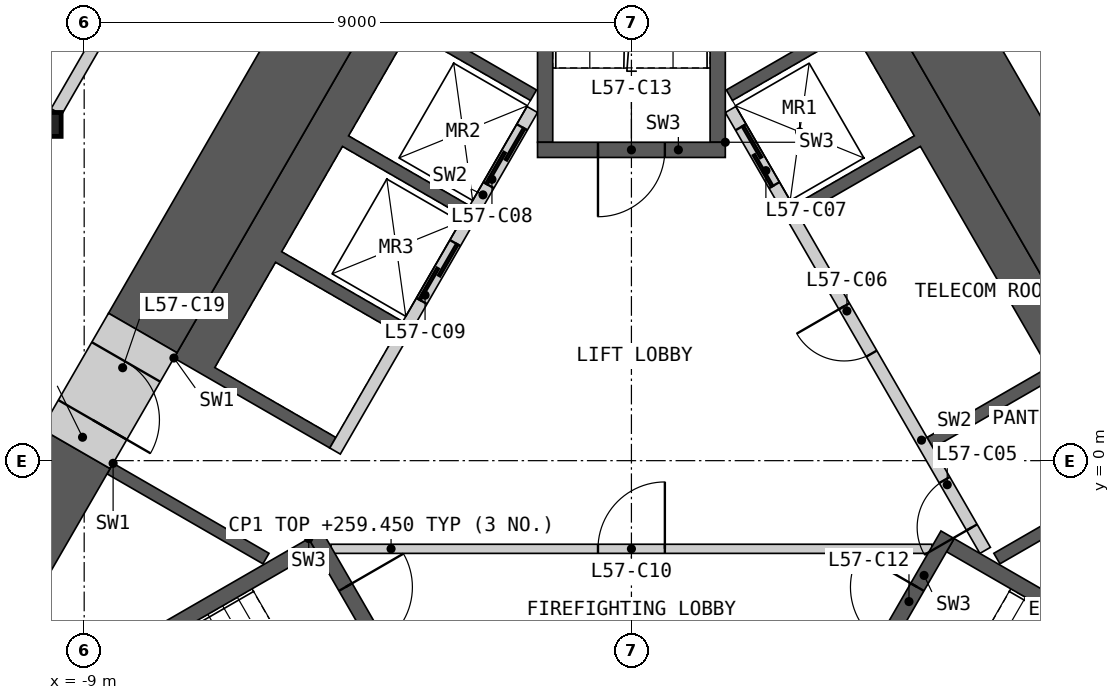
"""IFC4 building model, lengths in metres.
Left out: names, types, materials, properties, quantities, classifications, styles, units other than length and angle.
Written with IfcOpenShell. Run it as: python <this file> out.ifc"""

import sys

from ifc_helpers import new_model, si_unit, direction, frame, frame_2d, origin, origin_2d, place, context, subcontext, project, spatial, polyline, rectangle, i_section, outline, extrude, element, fill, save


model = new_model("IFC4")
c1 = context("Model", 3, precision=1e-05, world=origin(), true_north=direction((0.0, 1.0)))
c2 = subcontext(c1, "Body", "Model", "MODEL_VIEW")
j1 = project(units=[si_unit("LENGTHUNIT", "METRE"), si_unit("PLANEANGLEUNIT", "RADIAN")], contexts=[c1])
p1 = place(None, origin())
s1 = spatial("IfcSite", under=j1, at=p1, CompositionType="ELEMENT")
p2 = place(p1, origin())
s2 = spatial("IfcBuilding", under=s1, at=p2, CompositionType="ELEMENT")
p3 = place(p2, frame((0.0, 0.0, 256.2)))
s3 = spatial("IfcBuildingStorey", under=s2, at=p3, CompositionType="ELEMENT", Elevation=256.2)
p4 = place(p3, frame((-9.578, 5.53, 0.0), z_axis=(0.0, 0.0, 1.0), x_axis=(1.0, 0.0, 0.0)))
e1 = element("IfcColumn", 1, at=p4, inside=s3, PredefinedType="COLUMN", context=c2, shape_type="SweptSolid", body=[
    extrude(i_section(OverallWidth=0.399, OverallDepth=0.393, WebThickness=0.023, FlangeThickness=0.037, at=origin_2d()), origin(), (0.0, 0.0, 1.0), 3.6),
])
p5 = place(p3, origin())
e2 = element("IfcWall", 2, at=p5, inside=s3, PredefinedType="SHEAR", context=c2, shape_type="SweptSolid", body=[
    extrude(outline(polyline([(8.524, -0.044), (8.624, -0.217), (8.231, -0.444), (6.061, -1.697), (5.96, -1.524), (8.131, -0.271), (8.524, -0.044)])), origin(), (0.0, 0.0, 1.0), 3.25),
])
p6 = place(p3, origin())
e3 = element("IfcWall", 3, at=p6, inside=s3, PredefinedType="SHEAR", context=c2, shape_type="SweptSolid", body=[
    extrude(outline(polyline([(7.524, 1.688), (7.131, 1.461), (4.96, 0.208), (4.861, 0.381), (6.852, 1.531), (4.752, 5.169), (2.76, 4.019), (2.66, 4.192), (4.652, 5.342), (3.652, 7.074), (1.66, 5.924), (1.561, 6.097), (3.731, 7.35), (4.124, 7.577), (7.524, 1.688)])), origin(), (0.0, 0.0, 1.0), 3.25),
])
p7 = place(p3, frame((5.817, -1.476, 0.0), z_axis=(0.0, 0.0, 1.0), x_axis=(-0.500002616675, 0.866023893041, 0.0)))
e4 = element("IfcWall", 4, at=p7, inside=s3, PredefinedType="SOLIDWALL", context=c2, shape_type="SweptSolid", body=[
    extrude(rectangle(XDim=8.373, YDim=0.2, at=frame_2d((4.187, 0.0))), origin(), (0.0, 0.0, 1.0), 3.25),
])
p8 = place(p7, frame((0.437, 0.0, 0.0)))
e5 = element("IfcOpeningElement", 5, at=p8, cuts=e4, PredefinedType="OPENING", context=c2, shape_type="SweptSolid", body=[
    extrude(rectangle(XDim=0.9, YDim=2.1, at=frame_2d((0.45, 1.05))), frame((0.0, 0.11, 0.0), z_axis=(0.0, -1.0, 0.0), x_axis=(1.0, 0.0, 0.0)), (0.0, 0.0, 1.0), 0.22),
])
p9 = place(p7, frame((3.737, 0.0, 0.0)))
e6 = element("IfcOpeningElement", 6, at=p9, cuts=e4, PredefinedType="OPENING", context=c2, shape_type="SweptSolid", body=[
    extrude(rectangle(XDim=0.9, YDim=2.1, at=frame_2d((0.45, 1.05))), frame((0.0, 0.11, 0.0), z_axis=(0.0, -1.0, 0.0), x_axis=(1.0, 0.0, 0.0)), (0.0, 0.0, 1.0), 0.22),
])
p10 = place(p7, frame((6.937, 0.0, 0.0)))
e7 = element("IfcOpeningElement", 7, at=p10, cuts=e4, PredefinedType="OPENING", context=c2, shape_type="SweptSolid", body=[
    extrude(rectangle(XDim=1.1, YDim=2.1, at=frame_2d((0.55, 1.05))), frame((0.0, 0.11, 0.0), z_axis=(0.0, -1.0, 0.0), x_axis=(1.0, 0.0, 0.0)), (0.0, 0.0, 1.0), 0.22),
])
p11 = place(p3, origin())
e8 = element("IfcWall", 8, at=p11, inside=s3, PredefinedType="SHEAR", context=c2, shape_type="SweptSolid", body=[
    extrude(outline(polyline([(-7.524, 1.688), (-4.124, 7.577), (-3.731, 7.35), (-1.561, 6.097), (-1.66, 5.924), (-3.652, 7.074), (-4.652, 5.342), (-2.66, 4.192), (-2.76, 4.019), (-4.752, 5.169), (-5.752, 3.437), (-3.76, 2.287), (-3.861, 2.113), (-5.852, 3.263), (-6.852, 1.531), (-4.861, 0.381), (-4.96, 0.208), (-7.131, 1.461), (-7.524, 1.688)])), origin(), (0.0, 0.0, 1.0), 3.25),
])
p12 = place(p3, origin())
e9 = element("IfcWall", 9, at=p12, inside=s3, PredefinedType="SHEAR", context=c2, shape_type="SweptSolid", body=[
    extrude(outline(polyline([(-8.524, -0.044), (-8.131, -0.271), (-5.96, -1.524), (-6.061, -1.697), (-8.231, -0.444), (-8.624, -0.217), (-8.524, -0.044)])), origin(), (0.0, 0.0, 1.0), 3.25),
])
p13 = place(p3, frame((-1.631, 5.776, 0.0), z_axis=(0.0, 0.0, 1.0), x_axis=(-0.499992876559, -0.866029516466, 0.0)))
e10 = element("IfcWall", 10, at=p13, inside=s3, PredefinedType="SOLIDWALL", context=c2, shape_type="SweptSolid", body=[
    extrude(rectangle(XDim=6.486, YDim=0.2, at=frame_2d((3.243, 0.0))), origin(), (0.0, 0.0, 1.0), 3.25),
])
p14 = place(p13, frame((0.337, 0.0, 0.0)))
e11 = element("IfcOpeningElement", 11, at=p14, cuts=e10, PredefinedType="OPENING", context=c2, shape_type="SweptSolid", body=[
    extrude(rectangle(XDim=1.1, YDim=2.1, at=frame_2d((0.55, 1.05))), frame((0.0, 0.11, 0.0), z_axis=(0.0, -1.0, 0.0), x_axis=(1.0, 0.0, 0.0)), (0.0, 0.0, 1.0), 0.22),
])
p15 = place(p13, frame((2.537, 0.0, 0.0)))
e12 = element("IfcOpeningElement", 12, at=p15, cuts=e10, PredefinedType="OPENING", context=c2, shape_type="SweptSolid", body=[
    extrude(rectangle(XDim=1.1, YDim=2.1, at=frame_2d((0.55, 1.05))), frame((0.0, 0.11, 0.0), z_axis=(0.0, -1.0, 0.0), x_axis=(1.0, 0.0, 0.0)), (0.0, 0.0, 1.0), 0.22),
])
p16 = place(p3, frame((-4.941, -1.45, 0.0), z_axis=(0.0, 0.0, 1.0), x_axis=(1.0, 0.0, 0.0)))
e13 = element("IfcWall", 13, at=p16, inside=s3, PredefinedType="PARTITIONING", context=c2, shape_type="SweptSolid", body=[
    extrude(rectangle(XDim=9.882, YDim=0.15, at=frame_2d((4.941, 0.0))), origin(), (0.0, 0.0, 1.0), 3.25),
])
p17 = place(p16, frame((4.391, 0.0, 0.0)))
e14 = element("IfcOpeningElement", 14, at=p17, cuts=e13, PredefinedType="OPENING", context=c2, shape_type="SweptSolid", body=[
    extrude(rectangle(XDim=1.1, YDim=2.1, at=frame_2d((0.55, 1.05))), frame((0.0, 0.085, 0.0), z_axis=(0.0, -1.0, 0.0), x_axis=(1.0, 0.0, 0.0)), (0.0, 0.0, 1.0), 0.17),
])
p18 = place(p3, origin())
e15 = element("IfcWall", 15, at=p18, inside=s3, PredefinedType="SHEAR", context=c2, shape_type="SweptSolid", body=[
    extrude(outline(polyline([(-5.307, -1.281), (-10.374, -4.206), (-10.032, -4.298), (-5.182, -1.498), (-5.307, -1.281)])), origin(), (0.0, 0.0, 1.0), 3.25),
])
p19 = place(p3, frame((-5.199, -1.219, 0.0), z_axis=(0.0, 0.0, 1.0), x_axis=(0.499982516597, -0.866035497597, 0.0)))
e16 = element("IfcWall", 16, at=p19, inside=s3, PredefinedType="SHEAR", context=c2, shape_type="SweptSolid", body=[
    extrude(rectangle(XDim=3.088, YDim=0.25, at=frame_2d((1.544, 0.0))), origin(), (0.0, 0.0, 1.0), 3.25),
])
p20 = place(p19, frame((0.994, 0.0, 0.0)))
e17 = element("IfcOpeningElement", 17, at=p20, cuts=e16, PredefinedType="OPENING", context=c2, shape_type="SweptSolid", body=[
    extrude(rectangle(XDim=1.1, YDim=2.1, at=frame_2d((0.55, 1.05))), frame((0.0, 0.135, 0.0), z_axis=(0.0, -1.0, 0.0), x_axis=(1.0, 0.0, 0.0)), (0.0, 0.0, 1.0), 0.27),
])
p21 = place(p3, origin())
e18 = element("IfcWall", 18, at=p21, inside=s3, PredefinedType="SHEAR", context=c2, shape_type="SweptSolid", body=[
    extrude(outline(polyline([(10.032, -4.298), (10.374, -4.206), (5.307, -1.281), (5.182, -1.498), (10.032, -4.298)])), origin(), (0.0, 0.0, 1.0), 3.25),
])
p22 = place(p3, frame((3.655, -3.893, 0.0), z_axis=(0.0, 0.0, 1.0), x_axis=(0.499982516597, 0.866035497597, 0.0)))
e19 = element("IfcWall", 19, at=p22, inside=s3, PredefinedType="SHEAR", context=c2, shape_type="SweptSolid", body=[
    extrude(rectangle(XDim=3.088, YDim=0.25, at=frame_2d((1.544, 0.0))), origin(), (0.0, 0.0, 1.0), 3.25),
])
p23 = place(p22, frame((0.994, 0.0, 0.0)))
e20 = element("IfcOpeningElement", 20, at=p23, cuts=e19, PredefinedType="OPENING", context=c2, shape_type="SweptSolid", body=[
    extrude(rectangle(XDim=1.1, YDim=2.1, at=frame_2d((0.55, 1.05))), frame((0.0, 0.135, 0.0), z_axis=(0.0, -1.0, 0.0), x_axis=(1.0, 0.0, 0.0)), (0.0, 0.0, 1.0), 0.27),
])
p24 = place(p3, origin())
e21 = element("IfcWall", 21, at=p24, inside=s3, PredefinedType="SHEAR", context=c2, shape_type="SweptSolid", body=[
    extrude(outline(polyline([(1.544, 5.237), (1.544, 11.087), (1.294, 10.837), (1.294, 5.237), (1.544, 5.237)])), origin(), (0.0, 0.0, 1.0), 3.25),
])
p25 = place(p3, origin())
e22 = element("IfcWall", 22, at=p25, inside=s3, PredefinedType="SHEAR", context=c2, shape_type="SweptSolid", body=[
    extrude(outline(polyline([(-1.294, 10.837), (-1.544, 11.087), (-1.544, 5.237), (-1.294, 5.237), (-1.294, 10.837)])), origin(), (0.0, 0.0, 1.0), 3.25),
])
p26 = place(p3, frame((1.544, 5.112, 0.0), z_axis=(0.0, 0.0, 1.0), x_axis=(-1.0, 0.0, 0.0)))
e23 = element("IfcWall", 23, at=p26, inside=s3, PredefinedType="SHEAR", context=c2, shape_type="SweptSolid", body=[
    extrude(rectangle(XDim=3.088, YDim=0.25, at=frame_2d((1.544, 0.0))), origin(), (0.0, 0.0, 1.0), 3.25),
])
p27 = place(p26, frame((0.994, 0.0, 0.0)))
e24 = element("IfcOpeningElement", 24, at=p27, cuts=e23, PredefinedType="OPENING", context=c2, shape_type="SweptSolid", body=[
    extrude(rectangle(XDim=1.1, YDim=2.1, at=frame_2d((0.55, 1.05))), frame((0.0, 0.135, 0.0), z_axis=(0.0, -1.0, 0.0), x_axis=(1.0, 0.0, 0.0)), (0.0, 0.0, 1.0), 0.27),
])
p28 = place(p3, frame((10.081, -1.441, 0.0), z_axis=(0.0, 0.0, 1.0), x_axis=(-0.500006109471, 0.866021876451, 0.0)))
e25 = element("IfcWall", 25, at=p28, inside=s3, PredefinedType="SHEAR", context=c2, shape_type="SweptSolid", body=[
    extrude(rectangle(XDim=11.672, YDim=1.3, at=frame_2d((5.836, 0.0))), origin(), (0.0, 0.0, 1.0), 3.25),
])
p29 = place(p3, frame((-4.245, 8.668, 0.0), z_axis=(0.0, 0.0, 1.0), x_axis=(-0.500002971097, -0.866023688414, 0.0)))
e26 = element("IfcWall", 26, at=p29, inside=s3, PredefinedType="SHEAR", context=c2, shape_type="SweptSolid", body=[
    extrude(rectangle(XDim=7.584, YDim=1.3, at=frame_2d((3.792, 0.0))), origin(), (0.0, 0.0, 1.0), 3.25),
])
p30 = place(p3, frame((-9.137, 0.195, 0.0), z_axis=(0.0, 0.0, 1.0), x_axis=(-0.499985697398, -0.866033661238, 0.0)))
e27 = element("IfcWall", 27, at=p30, inside=s3, PredefinedType="SHEAR", context=c2, shape_type="SweptSolid", body=[
    extrude(rectangle(XDim=4.362, YDim=1.3, at=frame_2d((2.181, 0.0))), origin(), (0.0, 0.0, 1.0), 3.25),
])
p31 = place(p3, frame((-8.037, 2.1, 0.0), z_axis=(0.0, 0.0, 1.0), x_axis=(-0.50002983664, -0.866008176907, 0.0)))
e28 = element("IfcWall", 28, at=p31, inside=s3, PredefinedType="SHEAR", context=c2, shape_type="SweptSolid", body=[
    extrude(rectangle(XDim=2.2, YDim=1.3, at=frame_2d((1.1, 0.0))), origin(), (0.0, 0.0, 1.0), 3.25),
])
p32 = place(p31, frame((0.55, 0.0, 0.0)))
e29 = element("IfcOpeningElement", 29, at=p32, cuts=e28, PredefinedType="OPENING", context=c2, shape_type="SweptSolid", body=[
    extrude(rectangle(XDim=1.1, YDim=2.1, at=frame_2d((0.55, 1.05))), frame((0.0, 0.66, 0.0), z_axis=(0.0, -1.0, 0.0), x_axis=(1.0, 0.0, 0.0)), (0.0, 0.0, 1.0), 1.32),
])
p33 = place(p3, frame((5.377, 18.807, 0.0), z_axis=(0.0, 0.0, 1.0), x_axis=(0.499999852422, -0.866025488988, 0.0)))
e30 = element("IfcWall", 30, at=p33, inside=s3, PredefinedType="PARTITIONING", context=c2, shape_type="SweptSolid", body=[
    extrude(rectangle(XDim=27.198, YDim=0.2, at=frame_2d((13.599, 0.0))), origin(), (0.0, 0.0, 1.0), 3.25),
])
p34 = place(p33, frame((25.096, 0.0, 0.0)))
e31 = element("IfcOpeningElement", 31, at=p34, cuts=e30, PredefinedType="OPENING", context=c2, shape_type="SweptSolid", body=[
    extrude(rectangle(XDim=0.95, YDim=2.1, at=frame_2d((0.475, 1.05))), frame((0.0, 0.11, 0.0), z_axis=(0.0, -1.0, 0.0), x_axis=(1.0, 0.0, 0.0)), (0.0, 0.0, 1.0), 0.22),
])
p35 = place(p33, frame((19.122, 0.0, 0.0)))
e32 = element("IfcOpeningElement", 32, at=p35, cuts=e30, PredefinedType="OPENING", context=c2, shape_type="SweptSolid", body=[
    extrude(rectangle(XDim=1.0, YDim=2.1, at=frame_2d((0.5, 1.05))), frame((0.0, 0.11, 0.0), z_axis=(0.0, -1.0, 0.0), x_axis=(1.0, 0.0, 0.0)), (0.0, 0.0, 1.0), 0.22),
])
p36 = place(p33, frame((17.115, 0.0, 0.0)))
e33 = element("IfcOpeningElement", 33, at=p36, cuts=e30, PredefinedType="OPENING", context=c2, shape_type="SweptSolid", body=[
    extrude(rectangle(XDim=1.1, YDim=2.1, at=frame_2d((0.55, 1.05))), frame((0.0, 0.11, 0.0), z_axis=(0.0, -1.0, 0.0), x_axis=(1.0, 0.0, 0.0)), (0.0, 0.0, 1.0), 0.22),
])
p37 = place(p33, frame((0.35, 0.0, 0.0)))
e34 = element("IfcOpeningElement", 34, at=p37, cuts=e30, PredefinedType="OPENING", context=c2, shape_type="SweptSolid", body=[
    extrude(rectangle(XDim=1.1, YDim=2.1, at=frame_2d((0.55, 1.05))), frame((0.0, 0.11, 0.0), z_axis=(0.0, -1.0, 0.0), x_axis=(1.0, 0.0, 0.0)), (0.0, 0.0, 1.0), 0.22),
])
p38 = place(p3, frame((-9.458, 5.74, 0.0), z_axis=(0.0, 0.0, 1.0), x_axis=(0.50000207303, 0.866024206917, 0.0)))
e35 = element("IfcWall", 35, at=p38, inside=s3, PredefinedType="PARTITIONING", context=c2, shape_type="SweptSolid", body=[
    extrude(rectangle(XDim=9.095, YDim=0.2, at=frame_2d((4.547, 0.0))), origin(), (0.0, 0.0, 1.0), 3.25),
])
p39 = place(p38, frame((6.833, 0.0, 0.0)))
e36 = element("IfcOpeningElement", 36, at=p39, cuts=e35, PredefinedType="OPENING", context=c2, shape_type="SweptSolid", body=[
    extrude(rectangle(XDim=1.1, YDim=2.1, at=frame_2d((0.55, 1.05))), frame((0.0, 0.11, 0.0), z_axis=(0.0, -1.0, 0.0), x_axis=(1.0, 0.0, 0.0)), (0.0, 0.0, 1.0), 0.22),
])
p40 = place(p8, origin())
e37 = element("IfcDoor", 37, at=p40, inside=s3, OperationType="SINGLE_SWING_LEFT", PredefinedType="DOOR", context=c2, shape_type="SweptSolid", body=[
    extrude(rectangle(XDim=0.9, YDim=2.1, at=frame_2d((0.45, 1.05))), frame((0.0, 0.025, 0.0), z_axis=(0.0, -1.0, 0.0), x_axis=(1.0, 0.0, 0.0)), (0.0, 0.0, 1.0), 0.05),
])
fill(e5, e37)
p41 = place(p9, origin())
e38 = element("IfcDoor", 38, at=p41, inside=s3, OperationType="SINGLE_SWING_RIGHT", PredefinedType="DOOR", context=c2, shape_type="SweptSolid", body=[
    extrude(rectangle(XDim=0.9, YDim=2.1, at=frame_2d((0.45, 1.05))), frame((0.0, 0.025, 0.0), z_axis=(0.0, -1.0, 0.0), x_axis=(1.0, 0.0, 0.0)), (0.0, 0.0, 1.0), 0.05),
])
fill(e6, e38)
p42 = place(p10, origin())
e39 = element("IfcDoor", 39, at=p42, inside=s3, OperationType="SLIDING_TO_LEFT", PredefinedType="DOOR", context=c2, shape_type="SweptSolid", body=[
    extrude(rectangle(XDim=1.1, YDim=2.1, at=frame_2d((0.55, 1.05))), frame((0.0, 0.025, 0.0), z_axis=(0.0, -1.0, 0.0), x_axis=(1.0, 0.0, 0.0)), (0.0, 0.0, 1.0), 0.05),
])
fill(e7, e39)
p43 = place(p14, origin())
e40 = element("IfcDoor", 40, at=p43, inside=s3, OperationType="SLIDING_TO_LEFT", PredefinedType="DOOR", context=c2, shape_type="SweptSolid", body=[
    extrude(rectangle(XDim=1.1, YDim=2.1, at=frame_2d((0.55, 1.05))), frame((0.0, 0.025, 0.0), z_axis=(0.0, -1.0, 0.0), x_axis=(1.0, 0.0, 0.0)), (0.0, 0.0, 1.0), 0.05),
])
fill(e11, e40)
p44 = place(p15, origin())
e41 = element("IfcDoor", 41, at=p44, inside=s3, OperationType="SLIDING_TO_LEFT", PredefinedType="DOOR", context=c2, shape_type="SweptSolid", body=[
    extrude(rectangle(XDim=1.1, YDim=2.1, at=frame_2d((0.55, 1.05))), frame((0.0, 0.025, 0.0), z_axis=(0.0, -1.0, 0.0), x_axis=(1.0, 0.0, 0.0)), (0.0, 0.0, 1.0), 0.05),
])
fill(e12, e41)
p45 = place(p17, origin())
e42 = element("IfcDoor", 42, at=p45, inside=s3, OperationType="SINGLE_SWING_RIGHT", PredefinedType="DOOR", context=c2, shape_type="SweptSolid", body=[
    extrude(rectangle(XDim=1.1, YDim=2.1, at=frame_2d((0.55, 1.05))), frame((0.0, 0.025, 0.0), z_axis=(0.0, -1.0, 0.0), x_axis=(1.0, 0.0, 0.0)), (0.0, 0.0, 1.0), 0.05),
])
fill(e14, e42)
p46 = place(p20, origin())
e43 = element("IfcDoor", 43, at=p46, inside=s3, OperationType="SINGLE_SWING_LEFT", PredefinedType="DOOR", context=c2, shape_type="SweptSolid", body=[
    extrude(rectangle(XDim=1.1, YDim=2.1, at=frame_2d((0.55, 1.05))), frame((0.0, 0.025, 0.0), z_axis=(0.0, -1.0, 0.0), x_axis=(1.0, 0.0, 0.0)), (0.0, 0.0, 1.0), 0.05),
])
fill(e17, e43)
p47 = place(p23, origin())
e44 = element("IfcDoor", 44, at=p47, inside=s3, OperationType="SINGLE_SWING_RIGHT", PredefinedType="DOOR", context=c2, shape_type="SweptSolid", body=[
    extrude(rectangle(XDim=1.1, YDim=2.1, at=frame_2d((0.55, 1.05))), frame((0.0, 0.025, 0.0), z_axis=(0.0, -1.0, 0.0), x_axis=(1.0, 0.0, 0.0)), (0.0, 0.0, 1.0), 0.05),
])
fill(e20, e44)
p48 = place(p27, origin())
e45 = element("IfcDoor", 45, at=p48, inside=s3, OperationType="SINGLE_SWING_RIGHT", PredefinedType="DOOR", context=c2, shape_type="SweptSolid", body=[
    extrude(rectangle(XDim=1.1, YDim=2.1, at=frame_2d((0.55, 1.05))), frame((0.0, 0.025, 0.0), z_axis=(0.0, -1.0, 0.0), x_axis=(1.0, 0.0, 0.0)), (0.0, 0.0, 1.0), 0.05),
])
fill(e24, e45)
p49 = place(p32, origin())
e46 = element("IfcDoor", 46, at=p49, inside=s3, OperationType="SINGLE_SWING_RIGHT", PredefinedType="DOOR", context=c2, shape_type="SweptSolid", body=[
    extrude(rectangle(XDim=1.1, YDim=2.1, at=frame_2d((0.55, 1.05))), frame((0.0, 0.405, 0.0), z_axis=(0.0, -1.0, 0.0), x_axis=(1.0, 0.0, 0.0)), (0.0, 0.0, 1.0), 0.05),
])
fill(e29, e46)
save(model, sys.argv[1])
